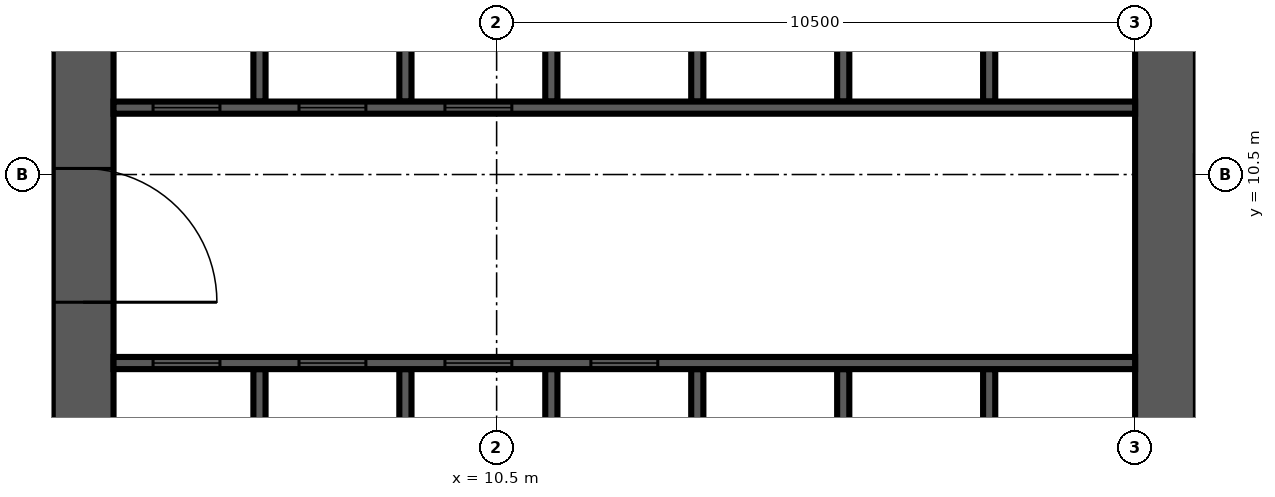
"""IFC4 building model, lengths in metres.
Left out: names, types, materials, properties, quantities, classifications, styles, units other than length and angle.
Written with IfcOpenShell. Run it as: python <this file> out.ifc"""

import sys

from ifc_helpers import new_model, si_unit, direction, frame, frame_2d, origin, place, context, subcontext, project, spatial, rectangle, extrude, source, transform, mapped, element, fill, save


model = new_model("IFC4")
c1 = context("Model", 3, precision=1e-05, world=origin(), true_north=direction((0.0, 1.0)))
c2 = subcontext(c1, "Body", "Model", "MODEL_VIEW")
j1 = project(units=[si_unit("LENGTHUNIT", "METRE"), si_unit("PLANEANGLEUNIT", "RADIAN")], contexts=[c1])
p1 = place(None, origin())
s1 = spatial("IfcSite", under=j1, at=p1, CompositionType="ELEMENT")
p2 = place(p1, origin())
s2 = spatial("IfcBuilding", under=s1, at=p2, CompositionType="ELEMENT")
p3 = place(p2, frame((0.0, 0.0, 153.9)))
s3 = spatial("IfcBuildingStorey", under=s2, at=p3, CompositionType="ELEMENT", Elevation=153.9)
m1 = source(origin(), c2, "Body", "SweptSolid", [
    extrude(rectangle(XDim=17.8, YDim=1.0, at=frame_2d((8.9, 0.0))), origin(), (0.0, 0.0, 1.0), 4.2),
])
p4 = place(p3, frame((3.7, 4.2, 0.0), z_axis=(0.0, 0.0, 1.0), x_axis=(0.0, 1.0, 0.0)))
e1 = element("IfcWall", 1, at=p4, inside=s3, PredefinedType="SHEAR", context=c2, shape_type="MappedRepresentation", body=[
    mapped(m1, transform((0.0, 0.0, 0.0), scale=1.0)),
])
m2 = source(origin(), c2, "Body", "SweptSolid", [
    extrude(rectangle(XDim=2.2, YDim=2.1, at=frame_2d((1.1, 1.05))), frame((0.0, 0.51, 0.0), z_axis=(0.0, -1.0, 0.0), x_axis=(1.0, 0.0, 0.0)), (0.0, 0.0, 1.0), 1.02),
])
p5 = place(p4, frame((4.2, 0.0, 0.0)))
e2 = element("IfcOpeningElement", 2, at=p5, cuts=e1, PredefinedType="OPENING", context=c2, shape_type="MappedRepresentation", body=[
    mapped(m2, transform((0.0, 0.0, 0.0), scale=1.0)),
])
m3 = source(origin(), c2, "Body", "SweptSolid", [
    extrude(rectangle(XDim=0.9, YDim=2.1, at=frame_2d((0.45, 1.05))), frame((0.0, 0.51, 0.0), z_axis=(0.0, -1.0, 0.0), x_axis=(1.0, 0.0, 0.0)), (0.0, 0.0, 1.0), 1.02),
])
p6 = place(p4, frame((10.95, 0.0, 0.0)))
e3 = element("IfcOpeningElement", 3, at=p6, cuts=e1, PredefinedType="OPENING", context=c2, shape_type="MappedRepresentation", body=[
    mapped(m3, transform((0.0, 0.0, 0.0), scale=1.0)),
])
m4 = source(origin(), c2, "Body", "SweptSolid", [
    extrude(rectangle(XDim=16.8, YDim=1.0, at=frame_2d((8.4, 0.0))), origin(), (0.0, 0.0, 1.0), 4.2),
])
p7 = place(p3, frame((21.5, 4.2, 0.0), z_axis=(0.0, 0.0, 1.0), x_axis=(0.0, 1.0, 0.0)))
e4 = element("IfcWall", 4, at=p7, inside=s3, PredefinedType="SHEAR", context=c2, shape_type="MappedRepresentation", body=[
    mapped(m4, transform((0.0, 0.0, 0.0), scale=1.0)),
])
m5 = source(origin(), c2, "Body", "SweptSolid", [
    extrude(rectangle(XDim=1.2, YDim=2.1, at=frame_2d((0.6, 1.05))), frame((0.0, 0.51, 0.0), z_axis=(0.0, -1.0, 0.0), x_axis=(1.0, 0.0, 0.0)), (0.0, 0.0, 1.0), 1.02),
])
p8 = place(p7, frame((14.7, 0.0, 0.0)))
e5 = element("IfcOpeningElement", 5, at=p8, cuts=e4, PredefinedType="OPENING", context=c2, shape_type="MappedRepresentation", body=[
    mapped(m5, transform((0.0, 0.0, 0.0), scale=1.0)),
])
m6 = source(origin(), c2, "Body", "SweptSolid", [
    extrude(rectangle(XDim=3.1, YDim=0.2, at=frame_2d((1.55, 0.0))), origin(), (0.0, 0.0, 1.0), 4.2),
])
for number, where, z_axis, x_axis in (
    (6, (6.6, 4.2, 0.0), (0.0, 0.0, 1.0), (0.0, 1.0, 0.0)),
    (7, (9.0, 4.2, 0.0), (0.0, 0.0, 1.0), (0.0, 1.0, 0.0)),
    (8, (11.4, 4.2, 0.0), (0.0, 0.0, 1.0), (0.0, 1.0, 0.0)),
    (9, (13.8, 4.2, 0.0), (0.0, 0.0, 1.0), (0.0, 1.0, 0.0)),
    (10, (16.2, 4.2, 0.0), (0.0, 0.0, 1.0), (0.0, 1.0, 0.0)),
    (11, (18.6, 4.2, 0.0), (0.0, 0.0, 1.0), (0.0, 1.0, 0.0)),
):
    element("IfcWall", number, at=place(p3, frame(where, z_axis=z_axis, x_axis=x_axis)), inside=s3, PredefinedType="SOLIDWALL", context=c2, shape_type="MappedRepresentation", body=[
        mapped(m6, transform((0.0, 0.0, 0.0), scale=1.0)),
    ])
m7 = source(origin(), c2, "Body", "SweptSolid", [
    extrude(rectangle(XDim=3.0, YDim=0.2, at=frame_2d((1.5, 0.0))), origin(), (0.0, 0.0, 1.0), 4.2),
])
for number, where, z_axis, x_axis in (
    (12, (6.6, 11.7, 0.0), (0.0, 0.0, 1.0), (0.0, 1.0, 0.0)),
    (13, (9.0, 11.7, 0.0), (0.0, 0.0, 1.0), (0.0, 1.0, 0.0)),
    (14, (11.4, 11.7, 0.0), (0.0, 0.0, 1.0), (0.0, 1.0, 0.0)),
    (15, (13.8, 11.7, 0.0), (0.0, 0.0, 1.0), (0.0, 1.0, 0.0)),
    (16, (16.2, 11.7, 0.0), (0.0, 0.0, 1.0), (0.0, 1.0, 0.0)),
    (17, (18.6, 11.7, 0.0), (0.0, 0.0, 1.0), (0.0, 1.0, 0.0)),
):
    element("IfcWall", number, at=place(p3, frame(where, z_axis=z_axis, x_axis=x_axis)), inside=s3, PredefinedType="SOLIDWALL", context=c2, shape_type="MappedRepresentation", body=[
        mapped(m7, transform((0.0, 0.0, 0.0), scale=1.0)),
    ])
m8 = source(origin(), c2, "Body", "SweptSolid", [
    extrude(rectangle(XDim=16.8, YDim=0.2, at=frame_2d((8.4, 0.0))), origin(), (0.0, 0.0, 1.0), 4.2),
])
p9 = place(p3, frame((4.2, 7.4, 0.0), z_axis=(0.0, 0.0, 1.0), x_axis=(1.0, 0.0, 0.0)))
e18 = element("IfcWall", 18, at=p9, inside=s3, PredefinedType="SOLIDWALL", context=c2, shape_type="MappedRepresentation", body=[
    mapped(m8, transform((0.0, 0.0, 0.0), scale=1.0)),
])
m9 = source(origin(), c2, "Body", "SweptSolid", [
    extrude(rectangle(XDim=1.1, YDim=2.1, at=frame_2d((0.55, 1.05))), frame((0.0, 0.11, 0.0), z_axis=(0.0, -1.0, 0.0), x_axis=(1.0, 0.0, 0.0)), (0.0, 0.0, 1.0), 0.22),
])
p10 = place(p9, frame((0.65, 0.0, 0.0)))
e19 = element("IfcOpeningElement", 19, at=p10, cuts=e18, PredefinedType="OPENING", context=c2, shape_type="MappedRepresentation", body=[
    mapped(m9, transform((0.0, 0.0, 0.0), scale=1.0)),
])
p11 = place(p9, frame((3.05, 0.0, 0.0)))
e20 = element("IfcOpeningElement", 20, at=p11, cuts=e18, PredefinedType="OPENING", context=c2, shape_type="MappedRepresentation", body=[
    mapped(m9, transform((0.0, 0.0, 0.0), scale=1.0)),
])
p12 = place(p9, frame((5.45, 0.0, 0.0)))
e21 = element("IfcOpeningElement", 21, at=p12, cuts=e18, PredefinedType="OPENING", context=c2, shape_type="MappedRepresentation", body=[
    mapped(m9, transform((0.0, 0.0, 0.0), scale=1.0)),
])
p13 = place(p9, frame((7.85, 0.0, 0.0)))
e22 = element("IfcOpeningElement", 22, at=p13, cuts=e18, PredefinedType="OPENING", context=c2, shape_type="MappedRepresentation", body=[
    mapped(m9, transform((0.0, 0.0, 0.0), scale=1.0)),
])
p14 = place(p3, frame((4.2, 11.6, 0.0), z_axis=(0.0, 0.0, 1.0), x_axis=(1.0, 0.0, 0.0)))
e23 = element("IfcWall", 23, at=p14, inside=s3, PredefinedType="SOLIDWALL", context=c2, shape_type="MappedRepresentation", body=[
    mapped(m8, transform((0.0, 0.0, 0.0), scale=1.0)),
])
p15 = place(p14, frame((0.65, 0.0, 0.0)))
e24 = element("IfcOpeningElement", 24, at=p15, cuts=e23, PredefinedType="OPENING", context=c2, shape_type="MappedRepresentation", body=[
    mapped(m9, transform((0.0, 0.0, 0.0), scale=1.0)),
])
p16 = place(p14, frame((3.05, 0.0, 0.0)))
e25 = element("IfcOpeningElement", 25, at=p16, cuts=e23, PredefinedType="OPENING", context=c2, shape_type="MappedRepresentation", body=[
    mapped(m9, transform((0.0, 0.0, 0.0), scale=1.0)),
])
p17 = place(p14, frame((5.45, 0.0, 0.0)))
e26 = element("IfcOpeningElement", 26, at=p17, cuts=e23, PredefinedType="OPENING", context=c2, shape_type="MappedRepresentation", body=[
    mapped(m9, transform((0.0, 0.0, 0.0), scale=1.0)),
])
m10 = source(origin(), c2, "Body", "SweptSolid", [
    extrude(rectangle(XDim=1.1, YDim=2.1, at=frame_2d((0.55, 1.05))), frame((0.0, 0.025, 0.0), z_axis=(0.0, -1.0, 0.0), x_axis=(1.0, 0.0, 0.0)), (0.0, 0.0, 1.0), 0.05),
])
p18 = place(p10, origin())
e27 = element("IfcDoor", 27, at=p18, inside=s3, OperationType="SLIDING_TO_LEFT", PredefinedType="DOOR", context=c2, shape_type="MappedRepresentation", body=[
    mapped(m10, transform((0.0, 0.0, 0.0), scale=1.0)),
])
fill(e19, e27)
p19 = place(p11, origin())
e28 = element("IfcDoor", 28, at=p19, inside=s3, OperationType="SLIDING_TO_LEFT", PredefinedType="DOOR", context=c2, shape_type="MappedRepresentation", body=[
    mapped(m10, transform((0.0, 0.0, 0.0), scale=1.0)),
])
fill(e20, e28)
p20 = place(p12, origin())
e29 = element("IfcDoor", 29, at=p20, inside=s3, OperationType="SLIDING_TO_LEFT", PredefinedType="DOOR", context=c2, shape_type="MappedRepresentation", body=[
    mapped(m10, transform((0.0, 0.0, 0.0), scale=1.0)),
])
fill(e21, e29)
p21 = place(p13, origin())
e30 = element("IfcDoor", 30, at=p21, inside=s3, OperationType="SLIDING_TO_LEFT", PredefinedType="DOOR", context=c2, shape_type="MappedRepresentation", body=[
    mapped(m10, transform((0.0, 0.0, 0.0), scale=1.0)),
])
fill(e22, e30)
p22 = place(p15, origin())
e31 = element("IfcDoor", 31, at=p22, inside=s3, OperationType="SLIDING_TO_LEFT", PredefinedType="DOOR", context=c2, shape_type="MappedRepresentation", body=[
    mapped(m10, transform((0.0, 0.0, 0.0), scale=1.0)),
])
fill(e24, e31)
p23 = place(p16, origin())
e32 = element("IfcDoor", 32, at=p23, inside=s3, OperationType="SLIDING_TO_LEFT", PredefinedType="DOOR", context=c2, shape_type="MappedRepresentation", body=[
    mapped(m10, transform((0.0, 0.0, 0.0), scale=1.0)),
])
fill(e25, e32)
p24 = place(p17, origin())
e33 = element("IfcDoor", 33, at=p24, inside=s3, OperationType="SLIDING_TO_LEFT", PredefinedType="DOOR", context=c2, shape_type="MappedRepresentation", body=[
    mapped(m10, transform((0.0, 0.0, 0.0), scale=1.0)),
])
fill(e26, e33)
m11 = source(origin(), c2, "Body", "SweptSolid", [
    extrude(rectangle(XDim=2.2, YDim=2.1, at=frame_2d((1.1, 1.05))), frame((0.0, 0.025, 0.0), z_axis=(0.0, -1.0, 0.0), x_axis=(1.0, 0.0, 0.0)), (0.0, 0.0, 1.0), 0.05),
])
p25 = place(p5, origin())
e34 = element("IfcDoor", 34, at=p25, inside=s3, OperationType="DOUBLE_DOOR_SINGLE_SWING", PredefinedType="DOOR", context=c2, shape_type="MappedRepresentation", body=[
    mapped(m11, transform((0.0, 0.0, 0.0), scale=1.0)),
])
fill(e2, e34)
save(model, sys.argv[1])
